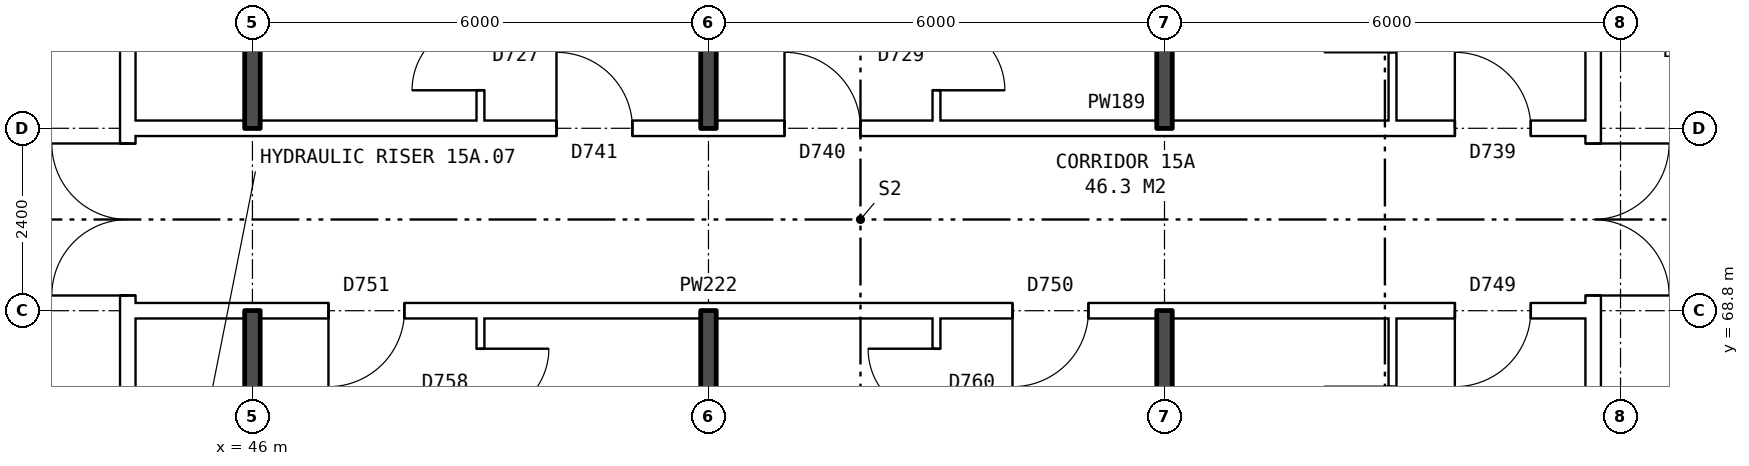
"""IFC4 building model, lengths in metres.
Left out: names, types, materials, properties, quantities, classifications, styles, units other than length and angle.
Written with IfcOpenShell. Run it as: python <this file> out.ifc"""

import sys

from ifc_helpers import new_model, si_unit, direction, frame, frame_2d, origin, place, context, subcontext, project, spatial, rectangle, extrude, element, fill, save


model = new_model("IFC4")
c1 = context("Model", 3, precision=1e-05, world=origin(), true_north=direction((0.0, 1.0)))
c2 = subcontext(c1, "Body", "Model", "MODEL_VIEW")
j1 = project(units=[si_unit("LENGTHUNIT", "METRE"), si_unit("PLANEANGLEUNIT", "RADIAN")], contexts=[c1])
p1 = place(None, origin())
s1 = spatial("IfcSite", under=j1, at=p1, CompositionType="ELEMENT")
p2 = place(p1, origin())
s2 = spatial("IfcBuilding", under=s1, at=p2, CompositionType="ELEMENT")
p3 = place(p2, frame((0.0, 0.0, 56.7)))
s3 = spatial("IfcBuildingStorey", under=s2, at=p3, CompositionType="ELEMENT", Elevation=56.7)
p4 = place(p3, frame((63.64, 63.9, 0.0), z_axis=(0.0, 0.0, 1.0), x_axis=(0.0, 1.0, 0.0)))
e1 = element("IfcWall", 1, at=p4, inside=s3, PredefinedType="PARTITIONING", context=c2, shape_type="SweptSolid", body=[
    extrude(rectangle(XDim=12.2, YDim=0.2, at=frame_2d((6.1, 0.0))), origin(), (0.0, 0.0, 1.0), 2.85),
])
p5 = place(p4, frame((5.1, 0.0, 0.0)))
e2 = element("IfcOpeningElement", 2, at=p5, cuts=e1, PredefinedType="OPENING", context=c2, shape_type="SweptSolid", body=[
    extrude(rectangle(XDim=2.0, YDim=2.1, at=frame_2d((1.0, 1.05))), frame((0.0, 0.11, 0.0), z_axis=(0.0, -1.0, 0.0), x_axis=(1.0, 0.0, 0.0)), (0.0, 0.0, 1.0), 0.22),
])
p6 = place(p3, frame((44.36, 63.9, 0.0), z_axis=(0.0, 0.0, 1.0), x_axis=(0.0, 1.0, 0.0)))
e3 = element("IfcWall", 3, at=p6, inside=s3, PredefinedType="PARTITIONING", context=c2, shape_type="SweptSolid", body=[
    extrude(rectangle(XDim=12.2, YDim=0.2, at=frame_2d((6.1, 0.0))), origin(), (0.0, 0.0, 1.0), 2.85),
])
p7 = place(p6, frame((5.1, 0.0, 0.0)))
e4 = element("IfcOpeningElement", 4, at=p7, cuts=e3, PredefinedType="OPENING", context=c2, shape_type="SweptSolid", body=[
    extrude(rectangle(XDim=2.0, YDim=2.1, at=frame_2d((1.0, 1.05))), frame((0.0, 0.11, 0.0), z_axis=(0.0, -1.0, 0.0), x_axis=(1.0, 0.0, 0.0)), (0.0, 0.0, 1.0), 0.22),
])
p8 = place(p3, frame((44.36, 68.8, 0.0), z_axis=(0.0, 0.0, 1.0), x_axis=(1.0, 0.0, 0.0)))
e5 = element("IfcWall", 5, at=p8, inside=s3, PredefinedType="PARTITIONING", context=c2, shape_type="SweptSolid", body=[
    extrude(rectangle(XDim=19.28, YDim=0.2, at=frame_2d((9.64, 0.0))), origin(), (0.0, 0.0, 1.0), 2.85),
])
p9 = place(p8, frame((17.46, 0.0, 0.0)))
e6 = element("IfcOpeningElement", 6, at=p9, cuts=e5, PredefinedType="OPENING", context=c2, shape_type="SweptSolid", body=[
    extrude(rectangle(XDim=1.0, YDim=2.1, at=frame_2d((0.5, 1.05))), frame((0.0, 0.11, 0.0), z_axis=(0.0, -1.0, 0.0), x_axis=(1.0, 0.0, 0.0)), (0.0, 0.0, 1.0), 0.22),
])
p10 = place(p8, frame((11.64, 0.0, 0.0)))
e7 = element("IfcOpeningElement", 7, at=p10, cuts=e5, PredefinedType="OPENING", context=c2, shape_type="SweptSolid", body=[
    extrude(rectangle(XDim=1.0, YDim=2.1, at=frame_2d((0.5, 1.05))), frame((0.0, 0.11, 0.0), z_axis=(0.0, -1.0, 0.0), x_axis=(1.0, 0.0, 0.0)), (0.0, 0.0, 1.0), 0.22),
])
p11 = place(p8, frame((2.64, 0.0, 0.0)))
e8 = element("IfcOpeningElement", 8, at=p11, cuts=e5, PredefinedType="OPENING", context=c2, shape_type="SweptSolid", body=[
    extrude(rectangle(XDim=1.0, YDim=2.1, at=frame_2d((0.5, 1.05))), frame((0.0, 0.11, 0.0), z_axis=(0.0, -1.0, 0.0), x_axis=(1.0, 0.0, 0.0)), (0.0, 0.0, 1.0), 0.22),
])
p12 = place(p3, frame((44.36, 71.2, 0.0), z_axis=(0.0, 0.0, 1.0), x_axis=(1.0, 0.0, 0.0)))
e9 = element("IfcWall", 9, at=p12, inside=s3, PredefinedType="PARTITIONING", context=c2, shape_type="SweptSolid", body=[
    extrude(rectangle(XDim=19.28, YDim=0.2, at=frame_2d((9.64, 0.0))), origin(), (0.0, 0.0, 1.0), 2.85),
])
p13 = place(p12, frame((17.46, 0.0, 0.0)))
e10 = element("IfcOpeningElement", 10, at=p13, cuts=e9, PredefinedType="OPENING", context=c2, shape_type="SweptSolid", body=[
    extrude(rectangle(XDim=1.0, YDim=2.1, at=frame_2d((0.5, 1.05))), frame((0.0, 0.11, 0.0), z_axis=(0.0, -1.0, 0.0), x_axis=(1.0, 0.0, 0.0)), (0.0, 0.0, 1.0), 0.22),
])
p14 = place(p12, frame((8.64, 0.0, 0.0)))
e11 = element("IfcOpeningElement", 11, at=p14, cuts=e9, PredefinedType="OPENING", context=c2, shape_type="SweptSolid", body=[
    extrude(rectangle(XDim=1.0, YDim=2.1, at=frame_2d((0.5, 1.05))), frame((0.0, 0.11, 0.0), z_axis=(0.0, -1.0, 0.0), x_axis=(1.0, 0.0, 0.0)), (0.0, 0.0, 1.0), 0.22),
])
p15 = place(p12, frame((5.64, 0.0, 0.0)))
e12 = element("IfcOpeningElement", 12, at=p15, cuts=e9, PredefinedType="OPENING", context=c2, shape_type="SweptSolid", body=[
    extrude(rectangle(XDim=1.0, YDim=2.1, at=frame_2d((0.5, 1.05))), frame((0.0, 0.11, 0.0), z_axis=(0.0, -1.0, 0.0), x_axis=(1.0, 0.0, 0.0)), (0.0, 0.0, 1.0), 0.22),
])
for number, where, z_axis, x_axis in (
    (13, (46.0, 63.8, 0.0), (0.0, 0.0, 1.0), (0.0, 1.0, 0.0)),
    (14, (46.0, 71.2, 0.0), (0.0, 0.0, 1.0), (0.0, 1.0, 0.0)),
):
    element("IfcWall", number, at=place(p3, frame(where, z_axis=z_axis, x_axis=x_axis)), inside=s3, PredefinedType="SOLIDWALL", context=c2, shape_type="SweptSolid", body=[
        extrude(rectangle(XDim=5.0, YDim=0.2, at=frame_2d((2.5, 0.0))), origin(), (0.0, 0.0, 1.0), 2.85),
    ])
p16 = place(p3, frame((49.0, 54.36, 0.0), z_axis=(0.0, 0.0, 1.0), x_axis=(0.0, 1.0, 0.0)))
e15 = element("IfcWall", 15, at=p16, inside=s3, PredefinedType="PARTITIONING", context=c2, shape_type="SweptSolid", body=[
    extrude(rectangle(XDim=14.34, YDim=0.1, at=frame_2d((7.17, 0.0))), origin(), (0.0, 0.0, 1.0), 2.85),
])
p17 = place(p16, frame((5.5, 0.0, 0.0)))
e16 = element("IfcOpeningElement", 16, at=p17, cuts=e15, PredefinedType="OPENING", context=c2, shape_type="SweptSolid", body=[
    extrude(rectangle(XDim=0.9, YDim=2.1, at=frame_2d((0.45, 1.05))), frame((0.0, 0.06, 0.0), z_axis=(0.0, -1.0, 0.0), x_axis=(1.0, 0.0, 0.0)), (0.0, 0.0, 1.0), 0.12),
])
p18 = place(p16, frame((13.04, 0.0, 0.0)))
e17 = element("IfcOpeningElement", 17, at=p18, cuts=e15, PredefinedType="OPENING", context=c2, shape_type="SweptSolid", body=[
    extrude(rectangle(XDim=0.9, YDim=2.1, at=frame_2d((0.45, 1.05))), frame((0.0, 0.06, 0.0), z_axis=(0.0, -1.0, 0.0), x_axis=(1.0, 0.0, 0.0)), (0.0, 0.0, 1.0), 0.12),
])
p19 = place(p3, frame((49.0, 71.3, 0.0), z_axis=(0.0, 0.0, 1.0), x_axis=(0.0, 1.0, 0.0)))
e18 = element("IfcWall", 18, at=p19, inside=s3, PredefinedType="PARTITIONING", context=c2, shape_type="SweptSolid", body=[
    extrude(rectangle(XDim=14.34, YDim=0.1, at=frame_2d((7.17, 0.0))), origin(), (0.0, 0.0, 1.0), 2.85),
])
p20 = place(p19, frame((6.74, 0.0, 0.0)))
e19 = element("IfcOpeningElement", 19, at=p20, cuts=e18, PredefinedType="OPENING", context=c2, shape_type="SweptSolid", body=[
    extrude(rectangle(XDim=0.9, YDim=2.1, at=frame_2d((0.45, 1.05))), frame((0.0, 0.06, 0.0), z_axis=(0.0, -1.0, 0.0), x_axis=(1.0, 0.0, 0.0)), (0.0, 0.0, 1.0), 0.12),
])
p21 = place(p19, frame((0.4, 0.0, 0.0)))
e20 = element("IfcOpeningElement", 20, at=p21, cuts=e18, PredefinedType="OPENING", context=c2, shape_type="SweptSolid", body=[
    extrude(rectangle(XDim=0.9, YDim=2.1, at=frame_2d((0.45, 1.05))), frame((0.0, 0.06, 0.0), z_axis=(0.0, -1.0, 0.0), x_axis=(1.0, 0.0, 0.0)), (0.0, 0.0, 1.0), 0.12),
])
for number, where, z_axis, x_axis in (
    (21, (52.0, 54.36, 0.0), (0.0, 0.0, 1.0), (0.0, 1.0, 0.0)),
    (22, (52.0, 71.2, 0.0), (0.0, 0.0, 1.0), (0.0, 1.0, 0.0)),
):
    element("IfcWall", number, at=place(p3, frame(where, z_axis=z_axis, x_axis=x_axis)), inside=s3, PredefinedType="SOLIDWALL", context=c2, shape_type="SweptSolid", body=[
        extrude(rectangle(XDim=14.44, YDim=0.2, at=frame_2d((7.22, 0.0))), origin(), (0.0, 0.0, 1.0), 2.85),
    ])
p22 = place(p3, frame((55.0, 54.36, 0.0), z_axis=(0.0, 0.0, 1.0), x_axis=(0.0, 1.0, 0.0)))
e23 = element("IfcWall", 23, at=p22, inside=s3, PredefinedType="PARTITIONING", context=c2, shape_type="SweptSolid", body=[
    extrude(rectangle(XDim=14.34, YDim=0.1, at=frame_2d((7.17, 0.0))), origin(), (0.0, 0.0, 1.0), 2.85),
])
p23 = place(p22, frame((7.7, 0.0, 0.0)))
e24 = element("IfcOpeningElement", 24, at=p23, cuts=e23, PredefinedType="OPENING", context=c2, shape_type="SweptSolid", body=[
    extrude(rectangle(XDim=0.9, YDim=2.1, at=frame_2d((0.45, 1.05))), frame((0.0, 0.06, 0.0), z_axis=(0.0, -1.0, 0.0), x_axis=(1.0, 0.0, 0.0)), (0.0, 0.0, 1.0), 0.12),
])
p24 = place(p22, frame((13.04, 0.0, 0.0)))
e25 = element("IfcOpeningElement", 25, at=p24, cuts=e23, PredefinedType="OPENING", context=c2, shape_type="SweptSolid", body=[
    extrude(rectangle(XDim=0.9, YDim=2.1, at=frame_2d((0.45, 1.05))), frame((0.0, 0.06, 0.0), z_axis=(0.0, -1.0, 0.0), x_axis=(1.0, 0.0, 0.0)), (0.0, 0.0, 1.0), 0.12),
])
p25 = place(p3, frame((55.0, 71.3, 0.0), z_axis=(0.0, 0.0, 1.0), x_axis=(0.0, 1.0, 0.0)))
e26 = element("IfcWall", 26, at=p25, inside=s3, PredefinedType="PARTITIONING", context=c2, shape_type="SweptSolid", body=[
    extrude(rectangle(XDim=14.34, YDim=0.1, at=frame_2d((7.17, 0.0))), origin(), (0.0, 0.0, 1.0), 2.85),
])
p26 = place(p25, frame((7.94, 0.0, 0.0)))
e27 = element("IfcOpeningElement", 27, at=p26, cuts=e26, PredefinedType="OPENING", context=c2, shape_type="SweptSolid", body=[
    extrude(rectangle(XDim=0.9, YDim=2.1, at=frame_2d((0.45, 1.05))), frame((0.0, 0.06, 0.0), z_axis=(0.0, -1.0, 0.0), x_axis=(1.0, 0.0, 0.0)), (0.0, 0.0, 1.0), 0.12),
])
p27 = place(p25, frame((0.4, 0.0, 0.0)))
e28 = element("IfcOpeningElement", 28, at=p27, cuts=e26, PredefinedType="OPENING", context=c2, shape_type="SweptSolid", body=[
    extrude(rectangle(XDim=0.9, YDim=2.1, at=frame_2d((0.45, 1.05))), frame((0.0, 0.06, 0.0), z_axis=(0.0, -1.0, 0.0), x_axis=(1.0, 0.0, 0.0)), (0.0, 0.0, 1.0), 0.12),
])
for number, where, z_axis, x_axis in (
    (29, (58.0, 54.36, 0.0), (0.0, 0.0, 1.0), (0.0, 1.0, 0.0)),
    (30, (58.0, 71.2, 0.0), (0.0, 0.0, 1.0), (0.0, 1.0, 0.0)),
):
    element("IfcWall", number, at=place(p3, frame(where, z_axis=z_axis, x_axis=x_axis)), inside=s3, PredefinedType="SOLIDWALL", context=c2, shape_type="SweptSolid", body=[
        extrude(rectangle(XDim=14.44, YDim=0.2, at=frame_2d((7.22, 0.0))), origin(), (0.0, 0.0, 1.0), 2.85),
    ])
p28 = place(p3, frame((61.0, 54.36, 0.0), z_axis=(0.0, 0.0, 1.0), x_axis=(0.0, 1.0, 0.0)))
e31 = element("IfcWall", 31, at=p28, inside=s3, PredefinedType="PARTITIONING", context=c2, shape_type="SweptSolid", body=[
    extrude(rectangle(XDim=14.34, YDim=0.1, at=frame_2d((7.17, 0.0))), origin(), (0.0, 0.0, 1.0), 2.85),
])
p29 = place(p28, frame((5.5, 0.0, 0.0)))
e32 = element("IfcOpeningElement", 32, at=p29, cuts=e31, PredefinedType="OPENING", context=c2, shape_type="SweptSolid", body=[
    extrude(rectangle(XDim=0.9, YDim=2.1, at=frame_2d((0.45, 1.05))), frame((0.0, 0.06, 0.0), z_axis=(0.0, -1.0, 0.0), x_axis=(1.0, 0.0, 0.0)), (0.0, 0.0, 1.0), 0.12),
])
p30 = place(p28, frame((12.54, 0.0, 0.0)))
e33 = element("IfcOpeningElement", 33, at=p30, cuts=e31, PredefinedType="OPENING", context=c2, shape_type="SweptSolid", body=[
    extrude(rectangle(XDim=0.9, YDim=2.1, at=frame_2d((0.45, 1.05))), frame((0.0, 0.06, 0.0), z_axis=(0.0, -1.0, 0.0), x_axis=(1.0, 0.0, 0.0)), (0.0, 0.0, 1.0), 0.12),
])
p31 = place(p3, frame((61.0, 71.3, 0.0), z_axis=(0.0, 0.0, 1.0), x_axis=(0.0, 1.0, 0.0)))
e34 = element("IfcWall", 34, at=p31, inside=s3, PredefinedType="PARTITIONING", context=c2, shape_type="SweptSolid", body=[
    extrude(rectangle(XDim=14.34, YDim=0.1, at=frame_2d((7.17, 0.0))), origin(), (0.0, 0.0, 1.0), 2.85),
])
p32 = place(p31, frame((9.24, 0.0, 0.0)))
e35 = element("IfcOpeningElement", 35, at=p32, cuts=e34, PredefinedType="OPENING", context=c2, shape_type="SweptSolid", body=[
    extrude(rectangle(XDim=0.9, YDim=2.1, at=frame_2d((0.45, 1.05))), frame((0.0, 0.06, 0.0), z_axis=(0.0, -1.0, 0.0), x_axis=(1.0, 0.0, 0.0)), (0.0, 0.0, 1.0), 0.12),
])
p33 = place(p31, frame((0.9, 0.0, 0.0)))
e36 = element("IfcOpeningElement", 36, at=p33, cuts=e34, PredefinedType="OPENING", context=c2, shape_type="SweptSolid", body=[
    extrude(rectangle(XDim=0.9, YDim=2.1, at=frame_2d((0.45, 1.05))), frame((0.0, 0.06, 0.0), z_axis=(0.0, -1.0, 0.0), x_axis=(1.0, 0.0, 0.0)), (0.0, 0.0, 1.0), 0.12),
])
p34 = place(p5, frame((2.0, 0.0, 0.0), z_axis=(0.0, 0.0, 1.0), x_axis=(-1.0, 0.0, 0.0)))
e37 = element("IfcDoor", 37, at=p34, inside=s3, OperationType="DOUBLE_DOOR_SINGLE_SWING", PredefinedType="DOOR", context=c2, shape_type="SweptSolid", body=[
    extrude(rectangle(XDim=2.0, YDim=2.1, at=frame_2d((1.0, 1.05))), frame((0.0, 0.025, 0.0), z_axis=(0.0, -1.0, 0.0), x_axis=(1.0, 0.0, 0.0)), (0.0, 0.0, 1.0), 0.05),
])
fill(e2, e37)
p35 = place(p7, origin())
e38 = element("IfcDoor", 38, at=p35, inside=s3, OperationType="DOUBLE_DOOR_SINGLE_SWING", PredefinedType="DOOR", context=c2, shape_type="SweptSolid", body=[
    extrude(rectangle(XDim=2.0, YDim=2.1, at=frame_2d((1.0, 1.05))), frame((0.0, 0.025, 0.0), z_axis=(0.0, -1.0, 0.0), x_axis=(1.0, 0.0, 0.0)), (0.0, 0.0, 1.0), 0.05),
])
fill(e4, e38)
p36 = place(p9, frame((1.0, 0.0, 0.0), z_axis=(0.0, 0.0, 1.0), x_axis=(-1.0, 0.0, 0.0)))
e39 = element("IfcDoor", 39, at=p36, inside=s3, OperationType="SINGLE_SWING_RIGHT", PredefinedType="DOOR", context=c2, shape_type="SweptSolid", body=[
    extrude(rectangle(XDim=1.0, YDim=2.1, at=frame_2d((0.5, 1.05))), frame((0.0, 0.025, 0.0), z_axis=(0.0, -1.0, 0.0), x_axis=(1.0, 0.0, 0.0)), (0.0, 0.0, 1.0), 0.05),
])
fill(e6, e39)
p37 = place(p10, frame((1.0, 0.0, 0.0), z_axis=(0.0, 0.0, 1.0), x_axis=(-1.0, 0.0, 0.0)))
e40 = element("IfcDoor", 40, at=p37, inside=s3, OperationType="SINGLE_SWING_RIGHT", PredefinedType="DOOR", context=c2, shape_type="SweptSolid", body=[
    extrude(rectangle(XDim=1.0, YDim=2.1, at=frame_2d((0.5, 1.05))), frame((0.0, 0.025, 0.0), z_axis=(0.0, -1.0, 0.0), x_axis=(1.0, 0.0, 0.0)), (0.0, 0.0, 1.0), 0.05),
])
fill(e7, e40)
p38 = place(p24, origin())
e41 = element("IfcDoor", 41, at=p38, inside=s3, OperationType="SINGLE_SWING_RIGHT", PredefinedType="DOOR", context=c2, shape_type="SweptSolid", body=[
    extrude(rectangle(XDim=0.9, YDim=2.1, at=frame_2d((0.45, 1.05))), frame((0.0, 0.025, 0.0), z_axis=(0.0, -1.0, 0.0), x_axis=(1.0, 0.0, 0.0)), (0.0, 0.0, 1.0), 0.05),
])
fill(e25, e41)
p39 = place(p11, frame((1.0, 0.0, 0.0), z_axis=(0.0, 0.0, 1.0), x_axis=(-1.0, 0.0, 0.0)))
e42 = element("IfcDoor", 42, at=p39, inside=s3, OperationType="SINGLE_SWING_RIGHT", PredefinedType="DOOR", context=c2, shape_type="SweptSolid", body=[
    extrude(rectangle(XDim=1.0, YDim=2.1, at=frame_2d((0.5, 1.05))), frame((0.0, 0.025, 0.0), z_axis=(0.0, -1.0, 0.0), x_axis=(1.0, 0.0, 0.0)), (0.0, 0.0, 1.0), 0.05),
])
fill(e8, e42)
p40 = place(p18, frame((0.9, 0.0, 0.0), z_axis=(0.0, 0.0, 1.0), x_axis=(-1.0, 0.0, 0.0)))
e43 = element("IfcDoor", 43, at=p40, inside=s3, OperationType="SINGLE_SWING_LEFT", PredefinedType="DOOR", context=c2, shape_type="SweptSolid", body=[
    extrude(rectangle(XDim=0.9, YDim=2.1, at=frame_2d((0.45, 1.05))), frame((0.0, 0.025, 0.0), z_axis=(0.0, -1.0, 0.0), x_axis=(1.0, 0.0, 0.0)), (0.0, 0.0, 1.0), 0.05),
])
fill(e17, e43)
p41 = place(p13, origin())
e44 = element("IfcDoor", 44, at=p41, inside=s3, OperationType="SINGLE_SWING_LEFT", PredefinedType="DOOR", context=c2, shape_type="SweptSolid", body=[
    extrude(rectangle(XDim=1.0, YDim=2.1, at=frame_2d((0.5, 1.05))), frame((0.0, 0.025, 0.0), z_axis=(0.0, -1.0, 0.0), x_axis=(1.0, 0.0, 0.0)), (0.0, 0.0, 1.0), 0.05),
])
fill(e10, e44)
p42 = place(p14, origin())
e45 = element("IfcDoor", 45, at=p42, inside=s3, OperationType="SINGLE_SWING_LEFT", PredefinedType="DOOR", context=c2, shape_type="SweptSolid", body=[
    extrude(rectangle(XDim=1.0, YDim=2.1, at=frame_2d((0.5, 1.05))), frame((0.0, 0.025, 0.0), z_axis=(0.0, -1.0, 0.0), x_axis=(1.0, 0.0, 0.0)), (0.0, 0.0, 1.0), 0.05),
])
fill(e11, e45)
p43 = place(p27, frame((0.9, 0.0, 0.0), z_axis=(0.0, 0.0, 1.0), x_axis=(-1.0, 0.0, 0.0)))
e46 = element("IfcDoor", 46, at=p43, inside=s3, OperationType="SINGLE_SWING_RIGHT", PredefinedType="DOOR", context=c2, shape_type="SweptSolid", body=[
    extrude(rectangle(XDim=0.9, YDim=2.1, at=frame_2d((0.45, 1.05))), frame((0.0, 0.025, 0.0), z_axis=(0.0, -1.0, 0.0), x_axis=(1.0, 0.0, 0.0)), (0.0, 0.0, 1.0), 0.05),
])
fill(e28, e46)
p44 = place(p15, origin())
e47 = element("IfcDoor", 47, at=p44, inside=s3, OperationType="SINGLE_SWING_LEFT", PredefinedType="DOOR", context=c2, shape_type="SweptSolid", body=[
    extrude(rectangle(XDim=1.0, YDim=2.1, at=frame_2d((0.5, 1.05))), frame((0.0, 0.025, 0.0), z_axis=(0.0, -1.0, 0.0), x_axis=(1.0, 0.0, 0.0)), (0.0, 0.0, 1.0), 0.05),
])
fill(e12, e47)
p45 = place(p21, origin())
e48 = element("IfcDoor", 48, at=p45, inside=s3, OperationType="SINGLE_SWING_LEFT", PredefinedType="DOOR", context=c2, shape_type="SweptSolid", body=[
    extrude(rectangle(XDim=0.9, YDim=2.1, at=frame_2d((0.45, 1.05))), frame((0.0, 0.025, 0.0), z_axis=(0.0, -1.0, 0.0), x_axis=(1.0, 0.0, 0.0)), (0.0, 0.0, 1.0), 0.05),
])
fill(e20, e48)
save(model, sys.argv[1])
